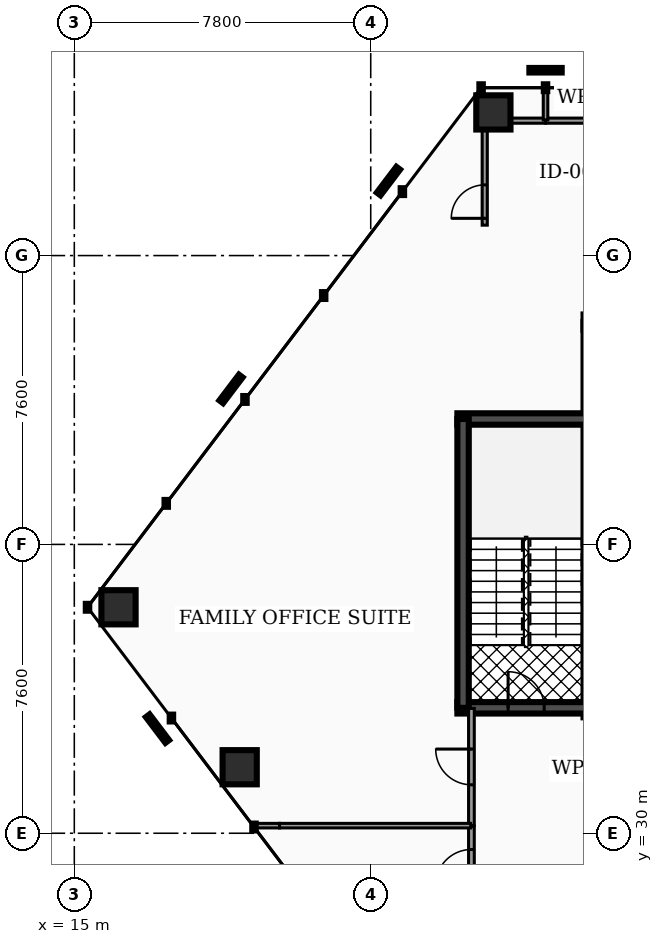
"""IFC4 building model, lengths in metres.
Left out: names, types, materials, properties, quantities, classifications, styles, units other than length and angle.
Written with IfcOpenShell. Run it as: python <this file> out.ifc"""

import sys

from ifc_helpers import new_model, si_unit, direction, frame, frame_2d, origin, origin_2d, place, context, subcontext, project, spatial, rectangle, hollow_rectangle, extrude, element, fill, save


model = new_model("IFC4")
c1 = context("Model", 3, precision=1e-05, world=origin(), true_north=direction((0.0, 1.0)))
c2 = subcontext(c1, "Body", "Model", "MODEL_VIEW")
j1 = project(units=[si_unit("LENGTHUNIT", "METRE"), si_unit("PLANEANGLEUNIT", "RADIAN")], contexts=[c1])
p1 = place(None, origin())
s1 = spatial("IfcSite", under=j1, at=p1, CompositionType="ELEMENT")
p2 = place(p1, origin())
s2 = spatial("IfcBuilding", under=s1, at=p2, CompositionType="ELEMENT")
p3 = place(p2, frame((0.0, 0.0, 84.66)))
s3 = spatial("IfcBuildingStorey", under=s2, at=p3, CompositionType="ELEMENT", Elevation=84.66)
p4 = place(p3, frame((25.08, 40.9, 0.0), z_axis=(0.0, 0.0, 1.0), x_axis=(1.0, 0.0, 0.0)))
e1 = element("IfcWall", 1, at=p4, inside=s3, PredefinedType="SHEAR", context=c2, shape_type="SweptSolid", body=[
    extrude(rectangle(XDim=3.52, YDim=0.3, at=frame_2d((1.76, 0.0))), origin(), (0.0, 0.0, 1.0), 3.82),
])
p5 = place(p3, frame((25.08, 33.3, 0.0), z_axis=(0.0, 0.0, 1.0), x_axis=(1.0, 0.0, 0.0)))
e2 = element("IfcWall", 2, at=p5, inside=s3, PredefinedType="SHEAR", context=c2, shape_type="SweptSolid", body=[
    extrude(rectangle(XDim=3.52, YDim=0.3, at=frame_2d((1.76, 0.0))), origin(), (0.0, 0.0, 1.0), 3.82),
])
p6 = place(p5, frame((1.335, 0.0, 0.0)))
e3 = element("IfcOpeningElement", 3, at=p6, cuts=e2, PredefinedType="OPENING", context=c2, shape_type="SweptSolid", body=[
    extrude(rectangle(XDim=0.95, YDim=2.2, at=frame_2d((0.475, 1.1))), frame((0.0, 0.16, 0.0), z_axis=(0.0, -1.0, 0.0), x_axis=(1.0, 0.0, 0.0)), (0.0, 0.0, 1.0), 0.32),
])
p7 = place(p3, frame((25.23, 33.3, 0.0), z_axis=(0.0, 0.0, 1.0), x_axis=(0.0, 1.0, 0.0)))
e4 = element("IfcWall", 4, at=p7, inside=s3, PredefinedType="SHEAR", context=c2, shape_type="SweptSolid", body=[
    extrude(rectangle(XDim=7.6, YDim=0.3, at=frame_2d((3.8, 0.0))), origin(), (0.0, 0.0, 1.0), 3.82),
])
for number, where, z_axis, x_axis in (
    (5, (26.028, 48.967, 0.0), (0.0, 0.0, 1.0), (1.0, 0.0, 0.0)),
    (6, (16.163, 35.946, 0.0), (0.0, 0.0, 1.0), (1.0, 0.0, 0.0)),
    (7, (19.352, 31.737, 0.0), (0.0, 0.0, 1.0), (1.0, 0.0, 0.0)),
):
    element("IfcColumn", number, at=place(p3, frame(where, z_axis=z_axis, x_axis=x_axis)), inside=s3, PredefinedType="COLUMN", context=c2, shape_type="SweptSolid", body=[
        extrude(hollow_rectangle(XDim=0.9, YDim=0.9, WallThickness=0.045, at=origin_2d()), origin(), (0.0, 0.0, 1.0), 3.82),
    ])
p8 = place(p3, frame((25.45, 28.02, 0.0), z_axis=(0.0, 0.0, 1.0), x_axis=(0.0, 1.0, 0.0)))
e8 = element("IfcWall", 8, at=p8, inside=s3, PredefinedType="PARTITIONING", context=c2, shape_type="SweptSolid", body=[
    extrude(rectangle(XDim=2.165, YDim=0.15, at=frame_2d((1.083, 0.0))), origin(), (0.0, 0.0, 1.0), 2.777),
])
p9 = place(p8, frame((0.613, 0.0, 0.0)))
e9 = element("IfcOpeningElement", 9, at=p9, cuts=e8, PredefinedType="OPENING", context=c2, shape_type="SweptSolid", body=[
    extrude(rectangle(XDim=0.94, YDim=2.05, at=frame_2d((0.47, 1.025))), frame((0.0, 0.085, 0.0), z_axis=(0.0, -1.0, 0.0), x_axis=(1.0, 0.0, 0.0)), (0.0, 0.0, 1.0), 0.17),
])
p10 = place(p3, frame((25.45, 30.205, 0.0), z_axis=(0.0, 0.0, 1.0), x_axis=(0.0, 1.0, 0.0)))
e10 = element("IfcWall", 10, at=p10, inside=s3, PredefinedType="PARTITIONING", context=c2, shape_type="SweptSolid", body=[
    extrude(rectangle(XDim=3.08, YDim=0.15, at=frame_2d((1.54, 0.0))), origin(), (0.0, 0.0, 1.0), 2.777),
])
p11 = place(p10, frame((1.07, 0.0, 0.0)))
e11 = element("IfcOpeningElement", 11, at=p11, cuts=e10, PredefinedType="OPENING", context=c2, shape_type="SweptSolid", body=[
    extrude(rectangle(XDim=0.94, YDim=2.05, at=frame_2d((0.47, 1.025))), frame((0.0, 0.085, 0.0), z_axis=(0.0, -1.0, 0.0), x_axis=(1.0, 0.0, 0.0)), (0.0, 0.0, 1.0), 0.17),
])
p12 = place(p3, frame((27.405, 48.75, 0.0), z_axis=(0.0, 0.0, 1.0), x_axis=(1.0, 0.0, 0.0)))
e12 = element("IfcWall", 12, at=p12, inside=s3, PredefinedType="PARTITIONING", context=c2, shape_type="SweptSolid", body=[
    extrude(rectangle(XDim=2.575, YDim=0.135, at=frame_2d((1.288, 0.0))), origin(), (0.0, 0.0, 1.0), 2.777),
])
p13 = place(p3, frame((25.8, 46.0, 0.0), z_axis=(0.0, 0.0, 1.0), x_axis=(0.0, 1.0, 0.0)))
e13 = element("IfcWall", 13, at=p13, inside=s3, PredefinedType="PARTITIONING", context=c2, shape_type="SweptSolid", body=[
    extrude(rectangle(XDim=2.584, YDim=0.135, at=frame_2d((1.292, 0.0))), origin(), (0.0, 0.0, 1.0), 2.777),
])
p14 = place(p13, frame((0.18, 0.0, 0.0)))
e14 = element("IfcOpeningElement", 14, at=p14, cuts=e13, PredefinedType="OPENING", context=c2, shape_type="SweptSolid", body=[
    extrude(rectangle(XDim=0.88, YDim=2.05, at=frame_2d((0.44, 1.025))), frame((0.0, 0.077, 0.0), z_axis=(0.0, -1.0, 0.0), x_axis=(1.0, 0.0, 0.0)), (0.0, 0.0, 1.0), 0.155),
])
p15 = place(p3, frame((25.966, 48.75, 0.0), z_axis=(0.0, 0.0, 1.0), x_axis=(1.0, 0.0, 0.0)))
e15 = element("IfcWall", 15, at=p15, inside=s3, PredefinedType="PARTITIONING", context=c2, shape_type="SweptSolid", body=[
    extrude(rectangle(XDim=1.429, YDim=0.135, at=frame_2d((0.715, 0.0))), origin(), (0.0, 0.0, 1.0), 2.777),
])
p16 = place(p3, frame((27.4, 48.77, 0.0), z_axis=(0.0, 0.0, 1.0), x_axis=(0.0, 1.0, 0.0)))
e16 = element("IfcWall", 16, at=p16, inside=s3, PredefinedType="PARTITIONING", context=c2, shape_type="SweptSolid", body=[
    extrude(rectangle(XDim=0.832, YDim=0.12, at=frame_2d((0.416, 0.0))), origin(), (0.0, 0.0, 1.0), 2.777),
])
p17 = place(p3, frame((19.716, 30.2, 0.0), z_axis=(0.0, 0.0, 1.0), x_axis=(1.0, 0.0, 0.0)))
e17 = element("IfcWall", 17, at=p17, inside=s3, PredefinedType="PARTITIONING", context=c2, shape_type="SweptSolid", body=[
    extrude(rectangle(XDim=0.684, YDim=0.12, at=frame_2d((0.342, 0.0))), origin(), (0.0, 0.0, 1.0), 2.777),
])
p18 = place(p3, frame((20.4, 30.2, 0.0), z_axis=(0.0, 0.0, 1.0), x_axis=(1.0, 0.0, 0.0)))
e18 = element("IfcWall", 18, at=p18, inside=s3, PredefinedType="PARTITIONING", context=c2, shape_type="SweptSolid", body=[
    extrude(rectangle(XDim=5.03, YDim=0.12, at=frame_2d((2.515, 0.0))), origin(), (0.0, 0.0, 1.0), 2.777),
])
p19 = place(p6, origin())
e19 = element("IfcDoor", 19, at=p19, inside=s3, OperationType="SINGLE_SWING_LEFT", PredefinedType="DOOR", context=c2, shape_type="SweptSolid", body=[
    extrude(rectangle(XDim=0.95, YDim=2.2, at=frame_2d((0.475, 1.1))), frame((0.0, 0.025, 0.0), z_axis=(0.0, -1.0, 0.0), x_axis=(1.0, 0.0, 0.0)), (0.0, 0.0, 1.0), 0.05),
])
fill(e3, e19)
p20 = place(p9, origin())
e20 = element("IfcDoor", 20, at=p20, inside=s3, OperationType="SINGLE_SWING_LEFT", PredefinedType="DOOR", context=c2, shape_type="SweptSolid", body=[
    extrude(rectangle(XDim=0.94, YDim=2.05, at=frame_2d((0.47, 1.025))), frame((0.0, 0.025, 0.0), z_axis=(0.0, -1.0, 0.0), x_axis=(1.0, 0.0, 0.0)), (0.0, 0.0, 1.0), 0.05),
])
fill(e9, e20)
p21 = place(p11, origin())
e21 = element("IfcDoor", 21, at=p21, inside=s3, OperationType="SINGLE_SWING_RIGHT", PredefinedType="DOOR", context=c2, shape_type="SweptSolid", body=[
    extrude(rectangle(XDim=0.94, YDim=2.05, at=frame_2d((0.47, 1.025))), frame((0.0, 0.025, 0.0), z_axis=(0.0, -1.0, 0.0), x_axis=(1.0, 0.0, 0.0)), (0.0, 0.0, 1.0), 0.05),
])
fill(e11, e21)
p22 = place(p14, origin())
e22 = element("IfcDoor", 22, at=p22, inside=s3, OperationType="SINGLE_SWING_LEFT", PredefinedType="DOOR", context=c2, shape_type="SweptSolid", body=[
    extrude(rectangle(XDim=0.88, YDim=2.05, at=frame_2d((0.44, 1.025))), frame((0.0, 0.025, 0.0), z_axis=(0.0, -1.0, 0.0), x_axis=(1.0, 0.0, 0.0)), (0.0, 0.0, 1.0), 0.05),
])
fill(e14, e22)
save(model, sys.argv[1])
